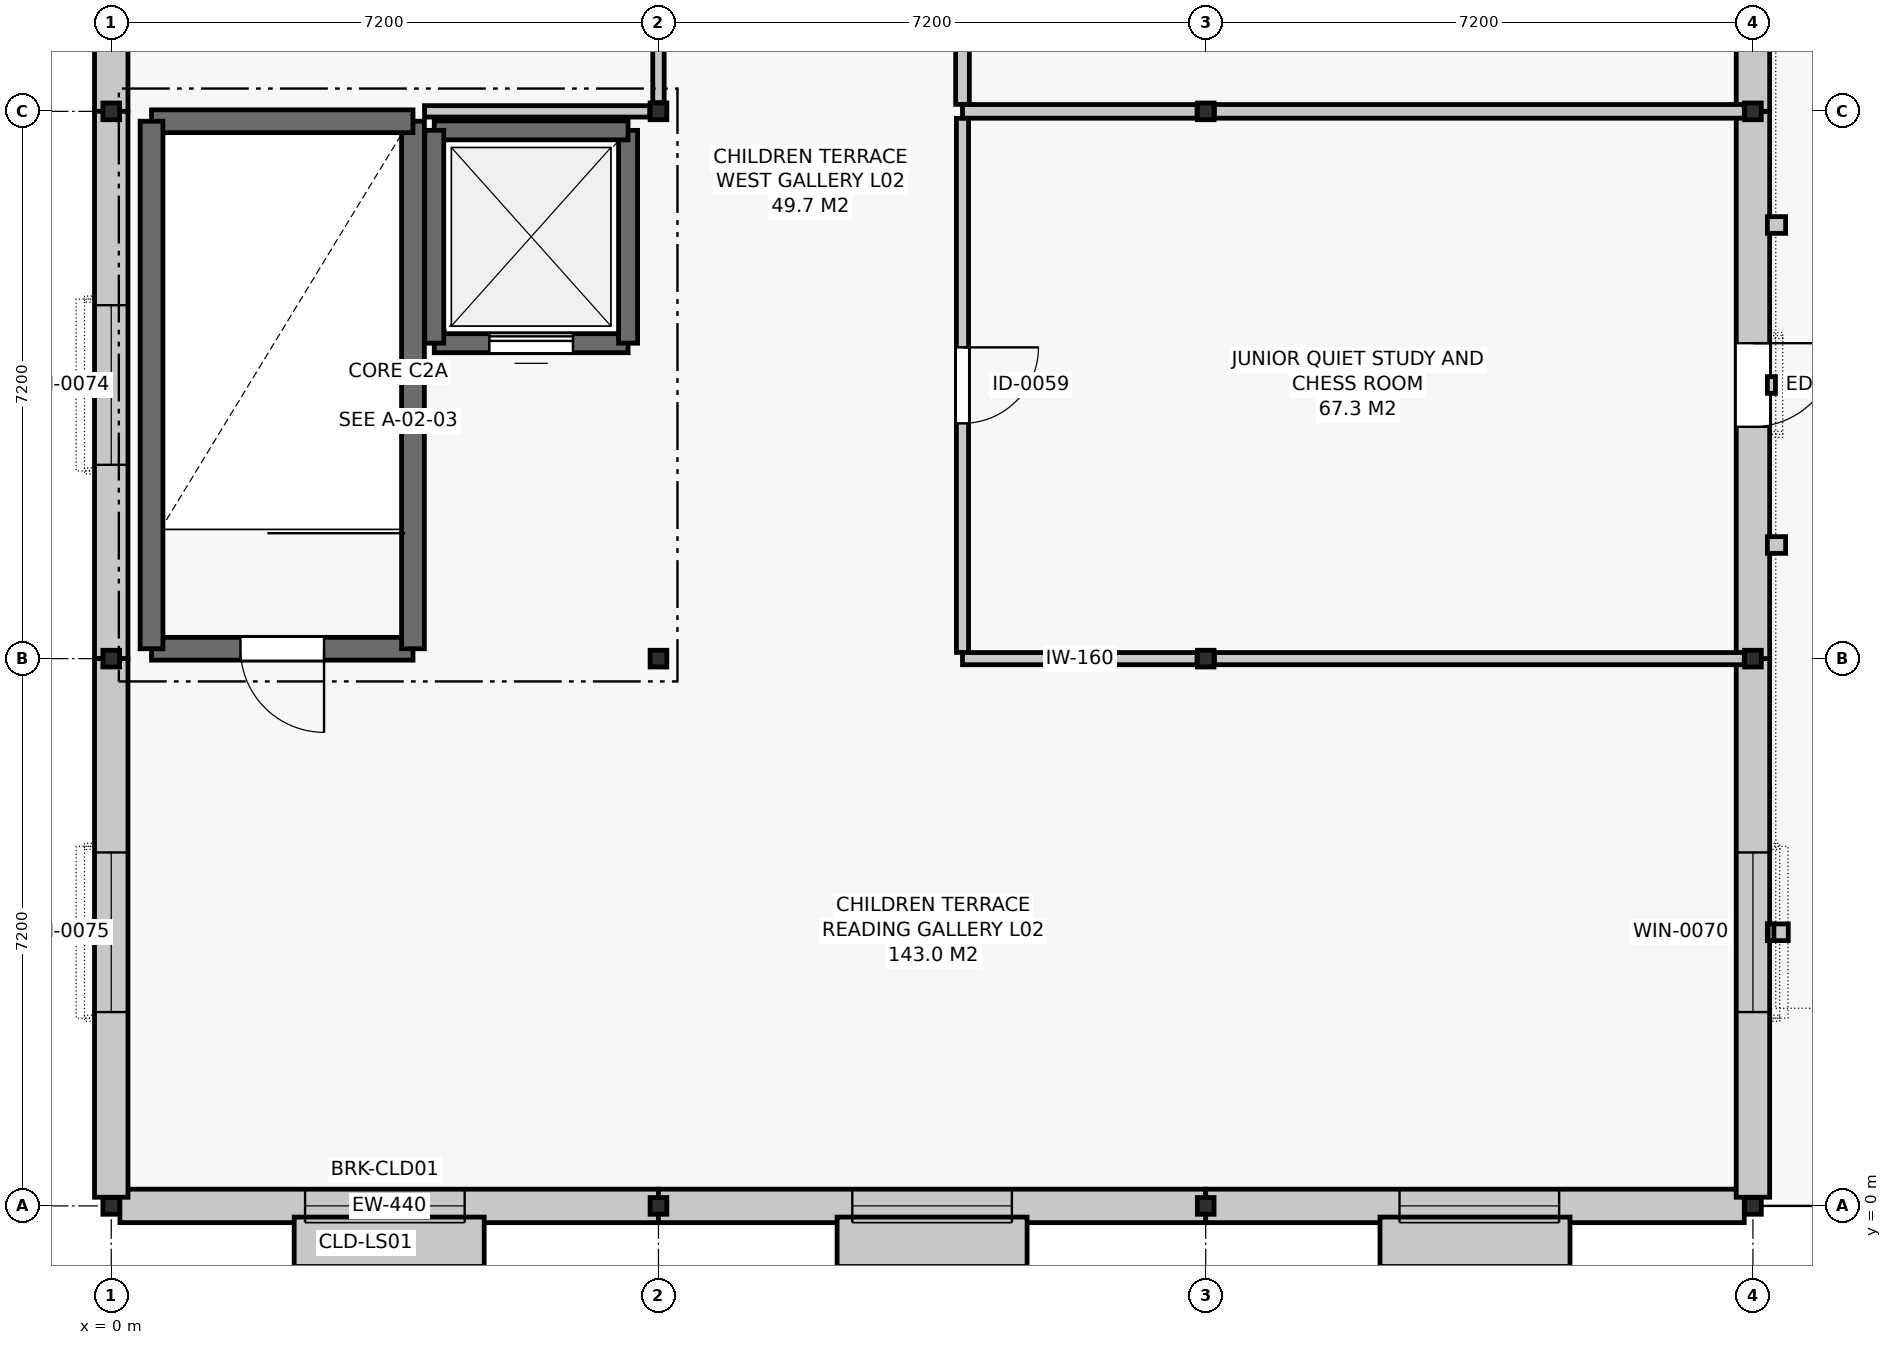
"""IFC4 building model, lengths in metres.
Left out: names, types, materials, properties, quantities, classifications, styles, units other than length and angle.
Written with IfcOpenShell. Run it as: python <this file> out.ifc"""

import sys

from ifc_helpers import new_model, si_unit, direction, frame, frame_2d, origin, origin_2d, place, context, subcontext, project, spatial, rectangle, i_section, extrude, element, fill, save


model = new_model("IFC4")
c1 = context("Model", 3, precision=1e-05, world=origin(), true_north=direction((0.0, 1.0)))
c2 = subcontext(c1, "Body", "Model", "MODEL_VIEW")
j1 = project(units=[si_unit("LENGTHUNIT", "METRE"), si_unit("PLANEANGLEUNIT", "RADIAN")], contexts=[c1])
p1 = place(None, origin())
s1 = spatial("IfcSite", under=j1, at=p1, CompositionType="ELEMENT")
p2 = place(p1, origin())
s2 = spatial("IfcBuilding", under=s1, at=p2, CompositionType="ELEMENT")
p3 = place(p2, frame((0.0, 0.0, 10.2)))
s3 = spatial("IfcBuildingStorey", under=s2, at=p3, CompositionType="ELEMENT", Elevation=10.2)
for number, where, z_axis, x_axis in (
    (1, (0.0, 0.0, 0.0), (0.0, 0.0, 1.0), (1.0, 0.0, 0.0)),
    (2, (0.0, 7.2, 0.0), (0.0, 0.0, 1.0), (1.0, 0.0, 0.0)),
    (3, (0.0, 14.4, 0.0), (0.0, 0.0, 1.0), (1.0, 0.0, 0.0)),
    (4, (7.2, 0.0, 0.0), (0.0, 0.0, 1.0), (1.0, 0.0, 0.0)),
    (5, (7.2, 7.2, 0.0), (0.0, 0.0, 1.0), (1.0, 0.0, 0.0)),
    (6, (7.2, 14.4, 0.0), (0.0, 0.0, 1.0), (1.0, 0.0, 0.0)),
    (7, (14.4, 0.0, 0.0), (0.0, 0.0, 1.0), (1.0, 0.0, 0.0)),
    (8, (14.4, 7.2, 0.0), (0.0, 0.0, 1.0), (1.0, 0.0, 0.0)),
    (9, (14.4, 14.4, 0.0), (0.0, 0.0, 1.0), (1.0, 0.0, 0.0)),
    (10, (21.6, 0.0, 0.0), (0.0, 0.0, 1.0), (1.0, 0.0, 0.0)),
    (11, (21.6, 7.2, 0.0), (0.0, 0.0, 1.0), (1.0, 0.0, 0.0)),
    (12, (21.6, 14.4, 0.0), (0.0, 0.0, 1.0), (1.0, 0.0, 0.0)),
):
    element("IfcColumn", number, at=place(p3, frame(where, z_axis=z_axis, x_axis=x_axis)), inside=s3, PredefinedType="COLUMN", context=c2, shape_type="SweptSolid", body=[
        extrude(i_section(OverallWidth=0.22, OverallDepth=0.22, WebThickness=0.01, FlangeThickness=0.016, FilletRadius=0.018, at=origin_2d()), origin(), (0.0, 0.0, 1.0), 4.2),
    ])
p4 = place(p3, frame((0.114, 0.0, 0.0), z_axis=(0.0, 0.0, 1.0), x_axis=(1.0, 0.0, 0.0)))
e13 = element("IfcWall", 13, at=p4, inside=s3, PredefinedType="SOLIDWALL", context=c2, shape_type="SweptSolid", body=[
    extrude(rectangle(XDim=7.086, YDim=0.44, at=frame_2d((3.543, 0.0))), origin(), (0.0, 0.0, 1.0), 3.24),
])
p5 = place(p4, frame((2.436, 0.0, 0.9)))
e14 = element("IfcOpeningElement", 14, at=p5, cuts=e13, PredefinedType="OPENING", context=c2, shape_type="SweptSolid", body=[
    extrude(rectangle(XDim=2.1, YDim=2.1, at=frame_2d((1.05, 1.05))), frame((0.0, 0.232, 0.0), z_axis=(0.0, -1.0, 0.0), x_axis=(1.0, 0.0, 0.0)), (0.0, 0.0, 1.0), 0.464),
])
p6 = place(p3, frame((7.2, 0.0, 0.0), z_axis=(0.0, 0.0, 1.0), x_axis=(1.0, 0.0, 0.0)))
e15 = element("IfcWall", 15, at=p6, inside=s3, PredefinedType="SOLIDWALL", context=c2, shape_type="SweptSolid", body=[
    extrude(rectangle(XDim=7.2, YDim=0.44, at=frame_2d((3.6, 0.0))), origin(), (0.0, 0.0, 1.0), 3.24),
])
p7 = place(p6, frame((2.55, 0.0, 0.9)))
e16 = element("IfcOpeningElement", 16, at=p7, cuts=e15, PredefinedType="OPENING", context=c2, shape_type="SweptSolid", body=[
    extrude(rectangle(XDim=2.1, YDim=2.1, at=frame_2d((1.05, 1.05))), frame((0.0, 0.232, 0.0), z_axis=(0.0, -1.0, 0.0), x_axis=(1.0, 0.0, 0.0)), (0.0, 0.0, 1.0), 0.464),
])
p8 = place(p3, frame((14.4, 0.0, 0.0), z_axis=(0.0, 0.0, 1.0), x_axis=(1.0, 0.0, 0.0)))
e17 = element("IfcWall", 17, at=p8, inside=s3, PredefinedType="SOLIDWALL", context=c2, shape_type="SweptSolid", body=[
    extrude(rectangle(XDim=7.086, YDim=0.44, at=frame_2d((3.543, 0.0))), origin(), (0.0, 0.0, 1.0), 3.24),
])
p9 = place(p8, frame((2.55, 0.0, 0.9)))
e18 = element("IfcOpeningElement", 18, at=p9, cuts=e17, PredefinedType="OPENING", context=c2, shape_type="SweptSolid", body=[
    extrude(rectangle(XDim=2.1, YDim=2.1, at=frame_2d((1.05, 1.05))), frame((0.0, 0.232, 0.0), z_axis=(0.0, -1.0, 0.0), x_axis=(1.0, 0.0, 0.0)), (0.0, 0.0, 1.0), 0.464),
])
p10 = place(p3, frame((21.6, 0.114, 0.0), z_axis=(0.0, 0.0, 1.0), x_axis=(0.0, 1.0, 0.0)))
e19 = element("IfcWall", 19, at=p10, inside=s3, PredefinedType="SOLIDWALL", context=c2, shape_type="SweptSolid", body=[
    extrude(rectangle(XDim=7.086, YDim=0.44, at=frame_2d((3.543, 0.0))), origin(), (0.0, 0.0, 1.0), 3.24),
])
p11 = place(p10, frame((2.436, 0.0, 0.9)))
e20 = element("IfcOpeningElement", 20, at=p11, cuts=e19, PredefinedType="OPENING", context=c2, shape_type="SweptSolid", body=[
    extrude(rectangle(XDim=2.1, YDim=2.1, at=frame_2d((1.05, 1.05))), frame((0.0, 0.232, 0.0), z_axis=(0.0, -1.0, 0.0), x_axis=(1.0, 0.0, 0.0)), (0.0, 0.0, 1.0), 0.464),
])
p12 = place(p3, frame((21.6, 7.2, 0.0), z_axis=(0.0, 0.0, 1.0), x_axis=(0.0, 1.0, 0.0)))
e21 = element("IfcWall", 21, at=p12, inside=s3, PredefinedType="SOLIDWALL", context=c2, shape_type="SweptSolid", body=[
    extrude(rectangle(XDim=7.2, YDim=0.44, at=frame_2d((3.6, 0.0))), origin(), (0.0, 0.0, 1.0), 3.24),
])
p13 = place(p12, frame((3.05, 0.0, 0.0)))
e22 = element("IfcOpeningElement", 22, at=p13, cuts=e21, PredefinedType="OPENING", context=c2, shape_type="SweptSolid", body=[
    extrude(rectangle(XDim=1.1, YDim=2.2, at=frame_2d((0.55, 1.1))), frame((0.0, 0.232, 0.0), z_axis=(0.0, -1.0, 0.0), x_axis=(1.0, 0.0, 0.0)), (0.0, 0.0, 1.0), 0.464),
])
p14 = place(p3, frame((21.6, 14.4, 0.0), z_axis=(0.0, 0.0, 1.0), x_axis=(0.0, 1.0, 0.0)))
e23 = element("IfcWall", 23, at=p14, inside=s3, PredefinedType="SOLIDWALL", context=c2, shape_type="SweptSolid", body=[
    extrude(rectangle(XDim=7.086, YDim=0.44, at=frame_2d((3.543, 0.0))), origin(), (0.0, 0.0, 1.0), 3.24),
])
p15 = place(p14, frame((2.55, 0.0, 0.9)))
e24 = element("IfcOpeningElement", 24, at=p15, cuts=e23, PredefinedType="OPENING", context=c2, shape_type="SweptSolid", body=[
    extrude(rectangle(XDim=2.1, YDim=2.1, at=frame_2d((1.05, 1.05))), frame((0.0, 0.232, 0.0), z_axis=(0.0, -1.0, 0.0), x_axis=(1.0, 0.0, 0.0)), (0.0, 0.0, 1.0), 0.464),
])
p16 = place(p3, frame((0.0, 21.486, 0.0), z_axis=(0.0, 0.0, 1.0), x_axis=(0.0, -1.0, 0.0)))
e25 = element("IfcWall", 25, at=p16, inside=s3, PredefinedType="SOLIDWALL", context=c2, shape_type="SweptSolid", body=[
    extrude(rectangle(XDim=7.086, YDim=0.44, at=frame_2d((3.543, 0.0))), origin(), (0.0, 0.0, 1.0), 3.24),
])
p17 = place(p3, frame((0.0, 14.4, 0.0), z_axis=(0.0, 0.0, 1.0), x_axis=(0.0, -1.0, 0.0)))
e26 = element("IfcWall", 26, at=p17, inside=s3, PredefinedType="SOLIDWALL", context=c2, shape_type="SweptSolid", body=[
    extrude(rectangle(XDim=7.2, YDim=0.44, at=frame_2d((3.6, 0.0))), origin(), (0.0, 0.0, 1.0), 3.24),
])
p18 = place(p17, frame((2.55, 0.0, 0.9)))
e27 = element("IfcOpeningElement", 27, at=p18, cuts=e26, PredefinedType="OPENING", context=c2, shape_type="SweptSolid", body=[
    extrude(rectangle(XDim=2.1, YDim=2.1, at=frame_2d((1.05, 1.05))), frame((0.0, 0.232, 0.0), z_axis=(0.0, -1.0, 0.0), x_axis=(1.0, 0.0, 0.0)), (0.0, 0.0, 1.0), 0.464),
])
p19 = place(p3, frame((0.0, 7.2, 0.0), z_axis=(0.0, 0.0, 1.0), x_axis=(0.0, -1.0, 0.0)))
e28 = element("IfcWall", 28, at=p19, inside=s3, PredefinedType="SOLIDWALL", context=c2, shape_type="SweptSolid", body=[
    extrude(rectangle(XDim=7.086, YDim=0.44, at=frame_2d((3.543, 0.0))), origin(), (0.0, 0.0, 1.0), 3.24),
])
p20 = place(p19, frame((2.55, 0.0, 0.9)))
e29 = element("IfcOpeningElement", 29, at=p20, cuts=e28, PredefinedType="OPENING", context=c2, shape_type="SweptSolid", body=[
    extrude(rectangle(XDim=2.1, YDim=2.1, at=frame_2d((1.05, 1.05))), frame((0.0, 0.232, 0.0), z_axis=(0.0, -1.0, 0.0), x_axis=(1.0, 0.0, 0.0)), (0.0, 0.0, 1.0), 0.464),
])
p21 = place(p3, frame((0.53, 7.33, 0.0), z_axis=(0.0, 0.0, 1.0), x_axis=(1.0, 0.0, 0.0)))
e30 = element("IfcWall", 30, at=p21, inside=s3, PredefinedType="SHEAR", context=c2, shape_type="SweptSolid", body=[
    extrude(rectangle(XDim=3.44, YDim=0.3, at=frame_2d((1.72, 0.0))), origin(), (0.0, 0.0, 1.0), 3.96),
])
p22 = place(p21, frame((1.17, 0.0, 0.0)))
e31 = element("IfcOpeningElement", 31, at=p22, cuts=e30, PredefinedType="OPENING", context=c2, shape_type="SweptSolid", body=[
    extrude(rectangle(XDim=1.1, YDim=2.15, at=frame_2d((0.55, 1.075))), frame((0.0, 0.162, 0.0), z_axis=(0.0, -1.0, 0.0), x_axis=(1.0, 0.0, 0.0)), (0.0, 0.0, 1.0), 0.324),
])
p23 = place(p3, frame((3.97, 7.33, 0.0), z_axis=(0.0, 0.0, 1.0), x_axis=(0.0, 1.0, 0.0)))
e32 = element("IfcWall", 32, at=p23, inside=s3, PredefinedType="SHEAR", context=c2, shape_type="SweptSolid", body=[
    extrude(rectangle(XDim=6.94, YDim=0.3, at=frame_2d((3.47, 0.0))), origin(), (0.0, 0.0, 1.0), 3.96),
])
p24 = place(p3, frame((3.97, 14.27, 0.0), z_axis=(0.0, 0.0, 1.0), x_axis=(-1.0, 0.0, 0.0)))
e33 = element("IfcWall", 33, at=p24, inside=s3, PredefinedType="SHEAR", context=c2, shape_type="SweptSolid", body=[
    extrude(rectangle(XDim=3.44, YDim=0.3, at=frame_2d((1.72, 0.0))), origin(), (0.0, 0.0, 1.0), 3.96),
])
p25 = place(p3, frame((0.53, 14.27, 0.0), z_axis=(0.0, 0.0, 1.0), x_axis=(0.0, -1.0, 0.0)))
e34 = element("IfcWall", 34, at=p25, inside=s3, PredefinedType="SHEAR", context=c2, shape_type="SweptSolid", body=[
    extrude(rectangle(XDim=6.94, YDim=0.3, at=frame_2d((3.47, 0.0))), origin(), (0.0, 0.0, 1.0), 3.96),
])
p26 = place(p3, frame((4.25, 11.35, 0.0), z_axis=(0.0, 0.0, 1.0), x_axis=(1.0, 0.0, 0.0)))
e35 = element("IfcWall", 35, at=p26, inside=s3, PredefinedType="SHEAR", context=c2, shape_type="SweptSolid", body=[
    extrude(rectangle(XDim=2.55, YDim=0.25, at=frame_2d((1.275, 0.0))), origin(), (0.0, 0.0, 1.0), 3.96),
])
p27 = place(p26, frame((0.725, 0.0, 0.0)))
e36 = element("IfcOpeningElement", 36, at=p27, cuts=e35, PredefinedType="OPENING", context=c2, shape_type="SweptSolid", body=[
    extrude(rectangle(XDim=1.1, YDim=2.1, at=frame_2d((0.55, 1.05))), frame((0.0, 0.137, 0.0), z_axis=(0.0, -1.0, 0.0), x_axis=(1.0, 0.0, 0.0)), (0.0, 0.0, 1.0), 0.274),
])
p28 = place(p3, frame((6.8, 11.35, 0.0), z_axis=(0.0, 0.0, 1.0), x_axis=(0.0, 1.0, 0.0)))
e37 = element("IfcWall", 37, at=p28, inside=s3, PredefinedType="SHEAR", context=c2, shape_type="SweptSolid", body=[
    extrude(rectangle(XDim=2.8, YDim=0.25, at=frame_2d((1.4, 0.0))), origin(), (0.0, 0.0, 1.0), 3.96),
])
p29 = place(p3, frame((6.8, 14.15, 0.0), z_axis=(0.0, 0.0, 1.0), x_axis=(-1.0, 0.0, 0.0)))
e38 = element("IfcWall", 38, at=p29, inside=s3, PredefinedType="SHEAR", context=c2, shape_type="SweptSolid", body=[
    extrude(rectangle(XDim=2.55, YDim=0.25, at=frame_2d((1.275, 0.0))), origin(), (0.0, 0.0, 1.0), 3.96),
])
p30 = place(p3, frame((4.25, 14.15, 0.0), z_axis=(0.0, 0.0, 1.0), x_axis=(0.0, -1.0, 0.0)))
e39 = element("IfcWall", 39, at=p30, inside=s3, PredefinedType="SHEAR", context=c2, shape_type="SweptSolid", body=[
    extrude(rectangle(XDim=2.8, YDim=0.25, at=frame_2d((1.4, 0.0))), origin(), (0.0, 0.0, 1.0), 3.96),
])
p31 = place(p3, frame((4.122, 14.4, 0.0), z_axis=(0.0, 0.0, 1.0), x_axis=(1.0, 0.0, 0.0)))
e40 = element("IfcWall", 40, at=p31, inside=s3, PredefinedType="PARTITIONING", context=c2, shape_type="SweptSolid", body=[
    extrude(rectangle(XDim=2.964, YDim=0.15, at=frame_2d((1.482, 0.0))), origin(), (0.0, 0.0, 1.0), 3.595),
])
p32 = place(p3, frame((11.2, 14.4, 0.0), z_axis=(0.0, 0.0, 1.0), x_axis=(1.0, 0.0, 0.0)))
e41 = element("IfcWall", 41, at=p32, inside=s3, PredefinedType="PARTITIONING", context=c2, shape_type="SweptSolid", body=[
    extrude(rectangle(XDim=3.086, YDim=0.18, at=frame_2d((1.543, 0.0))), origin(), (0.0, 0.0, 1.0), 3.595),
])
p33 = place(p3, frame((14.514, 14.4, 0.0), z_axis=(0.0, 0.0, 1.0), x_axis=(1.0, 0.0, 0.0)))
e42 = element("IfcWall", 42, at=p33, inside=s3, PredefinedType="PARTITIONING", context=c2, shape_type="SweptSolid", body=[
    extrude(rectangle(XDim=6.972, YDim=0.18, at=frame_2d((3.486, 0.0))), origin(), (0.0, 0.0, 1.0), 3.595),
])
p34 = place(p3, frame((11.2, 7.2, 0.0), z_axis=(0.0, 0.0, 1.0), x_axis=(1.0, 0.0, 0.0)))
e43 = element("IfcWall", 43, at=p34, inside=s3, PredefinedType="PARTITIONING", context=c2, shape_type="SweptSolid", body=[
    extrude(rectangle(XDim=3.086, YDim=0.16, at=frame_2d((1.543, 0.0))), origin(), (0.0, 0.0, 1.0), 3.595),
])
p35 = place(p3, frame((14.514, 7.2, 0.0), z_axis=(0.0, 0.0, 1.0), x_axis=(1.0, 0.0, 0.0)))
e44 = element("IfcWall", 44, at=p35, inside=s3, PredefinedType="PARTITIONING", context=c2, shape_type="SweptSolid", body=[
    extrude(rectangle(XDim=6.972, YDim=0.16, at=frame_2d((3.486, 0.0))), origin(), (0.0, 0.0, 1.0), 3.595),
])
p36 = place(p3, frame((7.2, 14.514, 0.0), z_axis=(0.0, 0.0, 1.0), x_axis=(0.0, 1.0, 0.0)))
e45 = element("IfcWall", 45, at=p36, inside=s3, PredefinedType="PARTITIONING", context=c2, shape_type="SweptSolid", body=[
    extrude(rectangle(XDim=3.209, YDim=0.15, at=frame_2d((1.604, 0.0))), origin(), (0.0, 0.0, 1.0), 3.595),
])
p37 = place(p36, frame((1.115, 0.0, 0.0)))
e46 = element("IfcOpeningElement", 46, at=p37, cuts=e45, PredefinedType="OPENING", context=c2, shape_type="SweptSolid", body=[
    extrude(rectangle(XDim=0.98, YDim=2.1, at=frame_2d((0.49, 1.05))), frame((0.0, 0.087, 0.0), z_axis=(0.0, -1.0, 0.0), x_axis=(1.0, 0.0, 0.0)), (0.0, 0.0, 1.0), 0.174),
])
p38 = place(p3, frame((11.2, 14.492, 0.0), z_axis=(0.0, 0.0, 1.0), x_axis=(0.0, 1.0, 0.0)))
e47 = element("IfcWall", 47, at=p38, inside=s3, PredefinedType="PARTITIONING", context=c2, shape_type="SweptSolid", body=[
    extrude(rectangle(XDim=7.053, YDim=0.18, at=frame_2d((3.526, 0.0))), origin(), (0.0, 0.0, 1.0), 3.395),
])
p39 = place(p38, frame((2.751, 0.0, 0.0)))
e48 = element("IfcOpeningElement", 48, at=p39, cuts=e47, PredefinedType="OPENING", context=c2, shape_type="SweptSolid", body=[
    extrude(rectangle(XDim=1.55, YDim=2.2, at=frame_2d((0.775, 1.1))), frame((0.0, 0.102, 0.0), z_axis=(0.0, -1.0, 0.0), x_axis=(1.0, 0.0, 0.0)), (0.0, 0.0, 1.0), 0.204),
])
p40 = place(p3, frame((11.2, 7.282, 0.0), z_axis=(0.0, 0.0, 1.0), x_axis=(0.0, 1.0, 0.0)))
e49 = element("IfcWall", 49, at=p40, inside=s3, PredefinedType="PARTITIONING", context=c2, shape_type="SweptSolid", body=[
    extrude(rectangle(XDim=7.026, YDim=0.16, at=frame_2d((3.513, 0.0))), origin(), (0.0, 0.0, 1.0), 3.645),
])
p41 = place(p40, frame((3.013, 0.0, 0.0)))
e50 = element("IfcOpeningElement", 50, at=p41, cuts=e49, PredefinedType="OPENING", context=c2, shape_type="SweptSolid", body=[
    extrude(rectangle(XDim=1.0, YDim=2.15, at=frame_2d((0.5, 1.075))), frame((0.0, 0.092, 0.0), z_axis=(0.0, -1.0, 0.0), x_axis=(1.0, 0.0, 0.0)), (0.0, 0.0, 1.0), 0.184),
])
p42 = place(p5, origin())
e51 = element("IfcWindow", 51, at=p42, inside=s3, PartitioningType="SINGLE_PANEL", PredefinedType="WINDOW", context=c2, shape_type="SweptSolid", body=[
    extrude(rectangle(XDim=2.1, YDim=2.1, at=frame_2d((1.05, 1.05))), frame((0.0, 0.03, 0.0), z_axis=(0.0, -1.0, 0.0), x_axis=(1.0, 0.0, 0.0)), (0.0, 0.0, 1.0), 0.06),
])
fill(e14, e51)
p43 = place(p7, origin())
e52 = element("IfcWindow", 52, at=p43, inside=s3, PartitioningType="SINGLE_PANEL", PredefinedType="WINDOW", context=c2, shape_type="SweptSolid", body=[
    extrude(rectangle(XDim=2.1, YDim=2.1, at=frame_2d((1.05, 1.05))), frame((0.0, 0.03, 0.0), z_axis=(0.0, -1.0, 0.0), x_axis=(1.0, 0.0, 0.0)), (0.0, 0.0, 1.0), 0.06),
])
fill(e16, e52)
p44 = place(p9, origin())
e53 = element("IfcWindow", 53, at=p44, inside=s3, PartitioningType="SINGLE_PANEL", PredefinedType="WINDOW", context=c2, shape_type="SweptSolid", body=[
    extrude(rectangle(XDim=2.1, YDim=2.1, at=frame_2d((1.05, 1.05))), frame((0.0, 0.03, 0.0), z_axis=(0.0, -1.0, 0.0), x_axis=(1.0, 0.0, 0.0)), (0.0, 0.0, 1.0), 0.06),
])
fill(e18, e53)
p45 = place(p11, origin())
e54 = element("IfcWindow", 54, at=p45, inside=s3, PartitioningType="SINGLE_PANEL", PredefinedType="WINDOW", context=c2, shape_type="SweptSolid", body=[
    extrude(rectangle(XDim=2.1, YDim=2.1, at=frame_2d((1.05, 1.05))), frame((0.0, 0.03, 0.0), z_axis=(0.0, -1.0, 0.0), x_axis=(1.0, 0.0, 0.0)), (0.0, 0.0, 1.0), 0.06),
])
fill(e20, e54)
p46 = place(p13, frame((1.1, 0.0, 0.0), z_axis=(0.0, 0.0, 1.0), x_axis=(-1.0, 0.0, 0.0)))
e55 = element("IfcDoor", 55, at=p46, inside=s3, OperationType="SINGLE_SWING_LEFT", PredefinedType="DOOR", context=c2, shape_type="SweptSolid", body=[
    extrude(rectangle(XDim=1.1, YDim=2.2, at=frame_2d((0.55, 1.1))), frame((0.0, 0.025, 0.0), z_axis=(0.0, -1.0, 0.0), x_axis=(1.0, 0.0, 0.0)), (0.0, 0.0, 1.0), 0.05),
])
fill(e22, e55)
p47 = place(p18, origin())
e56 = element("IfcWindow", 56, at=p47, inside=s3, PartitioningType="SINGLE_PANEL", PredefinedType="WINDOW", context=c2, shape_type="SweptSolid", body=[
    extrude(rectangle(XDim=2.1, YDim=2.1, at=frame_2d((1.05, 1.05))), frame((0.0, 0.03, 0.0), z_axis=(0.0, -1.0, 0.0), x_axis=(1.0, 0.0, 0.0)), (0.0, 0.0, 1.0), 0.06),
])
fill(e27, e56)
p48 = place(p20, origin())
e57 = element("IfcWindow", 57, at=p48, inside=s3, PartitioningType="SINGLE_PANEL", PredefinedType="WINDOW", context=c2, shape_type="SweptSolid", body=[
    extrude(rectangle(XDim=2.1, YDim=2.1, at=frame_2d((1.05, 1.05))), frame((0.0, 0.03, 0.0), z_axis=(0.0, -1.0, 0.0), x_axis=(1.0, 0.0, 0.0)), (0.0, 0.0, 1.0), 0.06),
])
fill(e29, e57)
p49 = place(p22, frame((1.1, 0.0, 0.0), z_axis=(0.0, 0.0, 1.0), x_axis=(-1.0, 0.0, 0.0)))
e58 = element("IfcDoor", 58, at=p49, inside=s3, OperationType="SINGLE_SWING_LEFT", PredefinedType="DOOR", context=c2, shape_type="SweptSolid", body=[
    extrude(rectangle(XDim=1.1, YDim=2.15, at=frame_2d((0.55, 1.075))), frame((0.0, 0.025, 0.0), z_axis=(0.0, -1.0, 0.0), x_axis=(1.0, 0.0, 0.0)), (0.0, 0.0, 1.0), 0.05),
])
fill(e31, e58)
p50 = place(p27, origin())
e59 = element("IfcDoor", 59, at=p50, inside=s3, OperationType="SLIDING_TO_LEFT", PredefinedType="DOOR", context=c2, shape_type="SweptSolid", body=[
    extrude(rectangle(XDim=1.1, YDim=2.1, at=frame_2d((0.55, 1.05))), frame((0.0, 0.025, 0.0), z_axis=(0.0, -1.0, 0.0), x_axis=(1.0, 0.0, 0.0)), (0.0, 0.0, 1.0), 0.05),
])
fill(e36, e59)
p51 = place(p41, frame((1.0, 0.0, 0.0), z_axis=(0.0, 0.0, 1.0), x_axis=(-1.0, 0.0, 0.0)))
e60 = element("IfcDoor", 60, at=p51, inside=s3, OperationType="SINGLE_SWING_LEFT", PredefinedType="DOOR", context=c2, shape_type="SweptSolid", body=[
    extrude(rectangle(XDim=1.0, YDim=2.15, at=frame_2d((0.5, 1.075))), frame((0.0, 0.025, 0.0), z_axis=(0.0, -1.0, 0.0), x_axis=(1.0, 0.0, 0.0)), (0.0, 0.0, 1.0), 0.05),
])
fill(e50, e60)
save(model, sys.argv[1])
